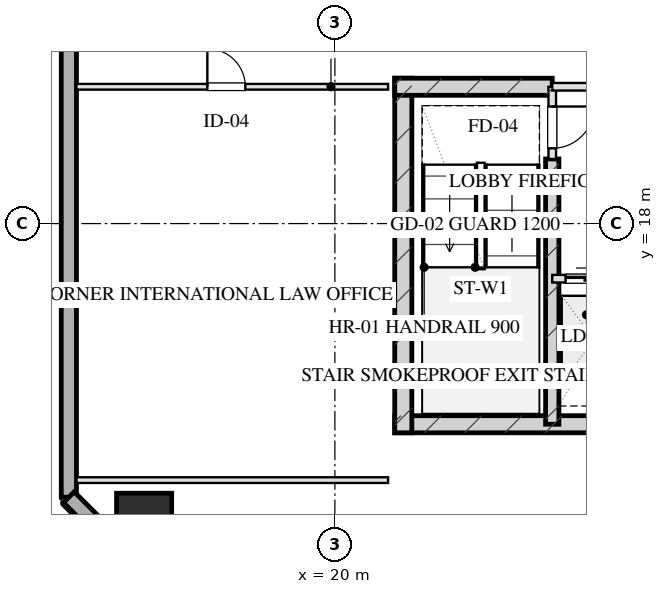
"""IFC4 building model, lengths in metres.
Left out: names, types, materials, properties, quantities, classifications, styles, units other than length and angle.
Written with IfcOpenShell. Run it as: python <this file> out.ifc"""

import sys

from ifc_helpers import new_model, si_unit, direction, frame, frame_2d, origin, origin_2d, place, context, subcontext, project, spatial, rectangle, hollow_rectangle, extrude, element, fill, save


model = new_model("IFC4")
c1 = context("Model", 3, precision=1e-05, world=origin(), true_north=direction((0.0, 1.0)))
c2 = subcontext(c1, "Body", "Model", "MODEL_VIEW")
j1 = project(units=[si_unit("LENGTHUNIT", "METRE"), si_unit("PLANEANGLEUNIT", "RADIAN")], contexts=[c1])
p1 = place(None, origin())
s1 = spatial("IfcSite", under=j1, at=p1, CompositionType="ELEMENT")
p2 = place(p1, origin())
s2 = spatial("IfcBuilding", under=s1, at=p2, CompositionType="ELEMENT")
p3 = place(p2, frame((0.0, 0.0, 192.05)))
s3 = spatial("IfcBuildingStorey", under=s2, at=p3, CompositionType="ELEMENT", Elevation=192.05)
p4 = place(p3, frame((21.575, 12.72, 0.0), z_axis=(0.0, 0.0, 1.0), x_axis=(1.0, 0.0, 0.0)))
e1 = element("IfcWall", 1, at=p4, inside=s3, PredefinedType="SHEAR", context=c2, shape_type="SweptSolid", body=[
    extrude(rectangle(XDim=16.85, YDim=0.45, at=frame_2d((8.425, 0.0))), origin(), (0.0, 0.0, 1.0), 3.45),
])
p5 = place(p3, frame((21.8, 21.825, 0.0), z_axis=(0.0, 0.0, 1.0), x_axis=(0.0, -1.0, 0.0)))
e2 = element("IfcWall", 2, at=p5, inside=s3, PredefinedType="SHEAR", context=c2, shape_type="SweptSolid", body=[
    extrude(rectangle(XDim=9.33, YDim=0.45, at=frame_2d((4.665, 0.0))), origin(), (0.0, 0.0, 1.0), 3.45),
])
p6 = place(p3, frame((25.72, 19.7, 0.0), z_axis=(0.0, 0.0, 1.0), x_axis=(0.0, -1.0, 0.0)))
e3 = element("IfcWall", 3, at=p6, inside=s3, PredefinedType="SHEAR", context=c2, shape_type="SweptSolid", body=[
    extrude(rectangle(XDim=6.98, YDim=0.35, at=frame_2d((3.49, 0.0))), origin(), (0.0, 0.0, 1.0), 3.45),
])
p7 = place(p3, frame((21.575, 21.6, 0.0), z_axis=(0.0, 0.0, 1.0), x_axis=(1.0, 0.0, 0.0)))
e4 = element("IfcWall", 4, at=p7, inside=s3, PredefinedType="SHEAR", context=c2, shape_type="SweptSolid", body=[
    extrude(rectangle(XDim=4.145, YDim=0.45, at=frame_2d((2.073, 0.0))), origin(), (0.0, 0.0, 1.0), 3.45),
])
p8 = place(p3, frame((14.98, 10.18, 0.0), z_axis=(0.0, 0.0, 1.0), x_axis=(1.0, 0.0, 0.0)))
e5 = element("IfcColumn", 5, at=p8, inside=s3, PredefinedType="COLUMN", context=c2, shape_type="SweptSolid", body=[
    extrude(hollow_rectangle(XDim=1.45, YDim=1.45, WallThickness=0.05, at=origin_2d()), origin(), (0.0, 0.0, 1.0), 3.451),
])
p9 = place(p3, frame((13.0, 10.8, 0.0), z_axis=(0.0, 0.0, 1.0), x_axis=(0.0, 1.0, 0.0)))
e6 = element("IfcWall", 6, at=p9, inside=s3, PredefinedType="SOLIDWALL", context=c2, shape_type="SweptSolid", body=[
    extrude(rectangle(XDim=46.4, YDim=0.4, at=frame_2d((23.2, 0.0))), origin(), (0.0, 0.0, 1.0), 2.61),
])
p10 = place(p9, frame((15.75, 0.0, 0.75)))
e7 = element("IfcOpeningElement", 7, at=p10, cuts=e6, PredefinedType="OPENING", context=c2, shape_type="SweptSolid", body=[
    extrude(rectangle(XDim=2.1, YDim=1.46, at=frame_2d((1.05, 0.73))), frame((0.0, 0.21, 0.0), z_axis=(0.0, -1.0, 0.0), x_axis=(1.0, 0.0, 0.0)), (0.0, 0.0, 1.0), 0.42),
])
p11 = place(p9, frame((19.55, 0.0, 0.75)))
e8 = element("IfcOpeningElement", 8, at=p11, cuts=e6, PredefinedType="OPENING", context=c2, shape_type="SweptSolid", body=[
    extrude(rectangle(XDim=2.1, YDim=1.46, at=frame_2d((1.05, 0.73))), frame((0.0, 0.21, 0.0), z_axis=(0.0, -1.0, 0.0), x_axis=(1.0, 0.0, 0.0)), (0.0, 0.0, 1.0), 0.42),
])
p12 = place(p9, frame((24.75, 0.0, 0.75)))
e9 = element("IfcOpeningElement", 9, at=p12, cuts=e6, PredefinedType="OPENING", context=c2, shape_type="SweptSolid", body=[
    extrude(rectangle(XDim=2.1, YDim=1.46, at=frame_2d((1.05, 0.73))), frame((0.0, 0.21, 0.0), z_axis=(0.0, -1.0, 0.0), x_axis=(1.0, 0.0, 0.0)), (0.0, 0.0, 1.0), 0.42),
])
p13 = place(p9, frame((28.55, 0.0, 0.75)))
e10 = element("IfcOpeningElement", 10, at=p13, cuts=e6, PredefinedType="OPENING", context=c2, shape_type="SweptSolid", body=[
    extrude(rectangle(XDim=2.1, YDim=1.46, at=frame_2d((1.05, 0.73))), frame((0.0, 0.21, 0.0), z_axis=(0.0, -1.0, 0.0), x_axis=(1.0, 0.0, 0.0)), (0.0, 0.0, 1.0), 0.42),
])
p14 = place(p3, frame((15.6, 8.2, 0.0), z_axis=(0.0, 0.0, 1.0), x_axis=(-0.707106781187, 0.707106781187, 0.0)))
e11 = element("IfcWall", 11, at=p14, inside=s3, PredefinedType="SOLIDWALL", context=c2, shape_type="SweptSolid", body=[
    extrude(rectangle(XDim=3.677, YDim=0.4, at=frame_2d((1.838, 0.0))), origin(), (0.0, 0.0, 1.0), 2.61),
])
p15 = place(p3, frame((25.72, 21.6, 0.0), z_axis=(0.0, 0.0, 1.0), x_axis=(0.0, -1.0, 0.0)))
e12 = element("IfcWall", 12, at=p15, inside=s3, PredefinedType="PARTITIONING", context=c2, shape_type="SweptSolid", body=[
    extrude(rectangle(XDim=1.9, YDim=0.2, at=frame_2d((0.95, 0.0))), origin(), (0.0, 0.0, 1.0), 3.175),
])
p16 = place(p15, frame((0.52, 0.0, 0.0)))
e13 = element("IfcOpeningElement", 13, at=p16, cuts=e12, PredefinedType="OPENING", context=c2, shape_type="SweptSolid", body=[
    extrude(rectangle(XDim=1.1, YDim=2.05, at=frame_2d((0.55, 1.025))), frame((0.0, 0.11, 0.0), z_axis=(0.0, -1.0, 0.0), x_axis=(1.0, 0.0, 0.0)), (0.0, 0.0, 1.0), 0.22),
])
p17 = place(p3, frame((25.72, 21.6, 0.0), z_axis=(0.0, 0.0, 1.0), x_axis=(1.0, 0.0, 0.0)))
e14 = element("IfcWall", 14, at=p17, inside=s3, PredefinedType="PARTITIONING", context=c2, shape_type="SweptSolid", body=[
    extrude(rectangle(XDim=3.83, YDim=0.2, at=frame_2d((1.915, 0.0))), origin(), (0.0, 0.0, 1.0), 3.175),
])
p18 = place(p17, frame((1.35, 0.0, 0.0)))
e15 = element("IfcOpeningElement", 15, at=p18, cuts=e14, PredefinedType="OPENING", context=c2, shape_type="SweptSolid", body=[
    extrude(rectangle(XDim=1.2, YDim=2.05, at=frame_2d((0.6, 1.025))), frame((0.0, 0.11, 0.0), z_axis=(0.0, -1.0, 0.0), x_axis=(1.0, 0.0, 0.0)), (0.0, 0.0, 1.0), 0.22),
])
p19 = place(p3, frame((25.72, 16.55, 0.0), z_axis=(0.0, 0.0, 1.0), x_axis=(1.0, 0.0, 0.0)))
e16 = element("IfcWall", 16, at=p19, inside=s3, PredefinedType="PARTITIONING", context=c2, shape_type="SweptSolid", body=[
    extrude(rectangle(XDim=2.1, YDim=0.2, at=frame_2d((1.05, 0.0))), origin(), (0.0, 0.0, 1.0), 3.175),
])
p20 = place(p19, frame((0.35, 0.0, 0.0)))
e17 = element("IfcOpeningElement", 17, at=p20, cuts=e16, PredefinedType="OPENING", context=c2, shape_type="SweptSolid", body=[
    extrude(rectangle(XDim=1.1, YDim=2.05, at=frame_2d((0.55, 1.025))), frame((0.0, 0.11, 0.0), z_axis=(0.0, -1.0, 0.0), x_axis=(1.0, 0.0, 0.0)), (0.0, 0.0, 1.0), 0.22),
])
p21 = place(p3, frame((13.2, 11.25, 0.0), z_axis=(0.0, 0.0, 1.0), x_axis=(1.0, 0.0, 0.0)))
e18 = element("IfcWall", 18, at=p21, inside=s3, PredefinedType="PARTITIONING", context=c2, shape_type="SweptSolid", body=[
    extrude(rectangle(XDim=8.2, YDim=0.15, at=frame_2d((4.1, 0.0))), origin(), (0.0, 0.0, 1.0), 3.175),
])
p22 = place(p3, frame((13.2, 21.6, 0.0), z_axis=(0.0, 0.0, 1.0), x_axis=(1.0, 0.0, 0.0)))
e19 = element("IfcWall", 19, at=p22, inside=s3, PredefinedType="PARTITIONING", context=c2, shape_type="SweptSolid", body=[
    extrude(rectangle(XDim=8.2, YDim=0.15, at=frame_2d((4.1, 0.0))), origin(), (0.0, 0.0, 1.0), 3.175),
])
p23 = place(p22, frame((3.444, 0.0, 0.0)))
e20 = element("IfcOpeningElement", 20, at=p23, cuts=e19, PredefinedType="OPENING", context=c2, shape_type="SweptSolid", body=[
    extrude(rectangle(XDim=1.0, YDim=2.05, at=frame_2d((0.5, 1.025))), frame((0.0, 0.085, 0.0), z_axis=(0.0, -1.0, 0.0), x_axis=(1.0, 0.0, 0.0)), (0.0, 0.0, 1.0), 0.17),
])
p24 = place(p16, origin())
e21 = element("IfcDoor", 21, at=p24, inside=s3, OperationType="SINGLE_SWING_LEFT", PredefinedType="DOOR", context=c2, shape_type="SweptSolid", body=[
    extrude(rectangle(XDim=1.1, YDim=2.05, at=frame_2d((0.55, 1.025))), frame((0.0, 0.025, 0.0), z_axis=(0.0, -1.0, 0.0), x_axis=(1.0, 0.0, 0.0)), (0.0, 0.0, 1.0), 0.05),
])
fill(e13, e21)
p25 = place(p20, origin())
e22 = element("IfcDoor", 22, at=p25, inside=s3, OperationType="DOUBLE_DOOR_SLIDING", PredefinedType="DOOR", context=c2, shape_type="SweptSolid", body=[
    extrude(rectangle(XDim=1.1, YDim=2.05, at=frame_2d((0.55, 1.025))), frame((0.0, 0.025, 0.0), z_axis=(0.0, -1.0, 0.0), x_axis=(1.0, 0.0, 0.0)), (0.0, 0.0, 1.0), 0.05),
])
fill(e17, e22)
p26 = place(p23, origin())
e23 = element("IfcDoor", 23, at=p26, inside=s3, OperationType="SINGLE_SWING_LEFT", PredefinedType="DOOR", context=c2, shape_type="SweptSolid", body=[
    extrude(rectangle(XDim=1.0, YDim=2.05, at=frame_2d((0.5, 1.025))), frame((0.0, 0.025, 0.0), z_axis=(0.0, -1.0, 0.0), x_axis=(1.0, 0.0, 0.0)), (0.0, 0.0, 1.0), 0.05),
])
fill(e20, e23)
save(model, sys.argv[1])
